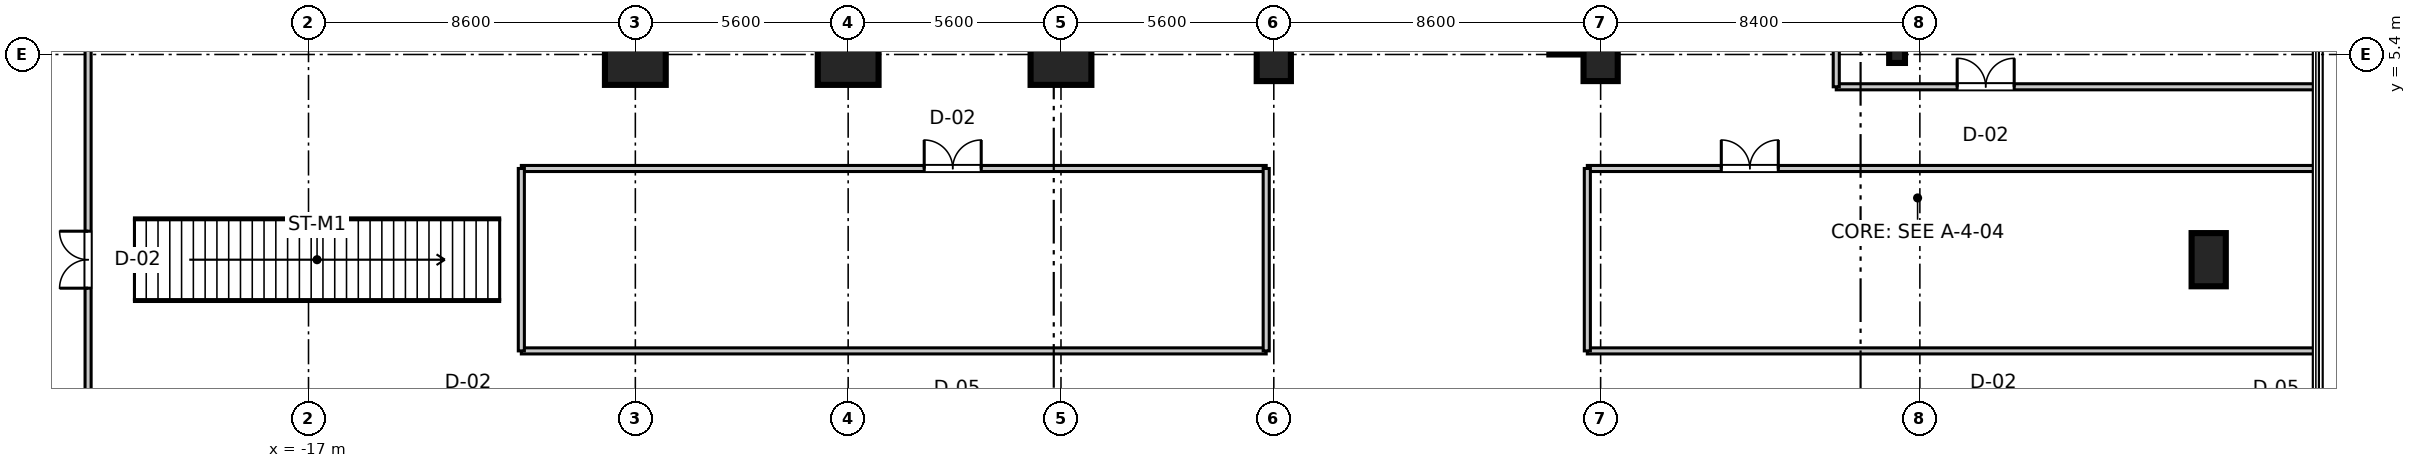
"""IFC4 building model, lengths in metres.
Left out: names, types, materials, properties, quantities, classifications, styles, units other than length and angle.
Written with IfcOpenShell. Run it as: python <this file> out.ifc"""

import sys

from ifc_helpers import new_model, si_unit, direction, frame, frame_2d, origin, origin_2d, place, context, subcontext, project, spatial, rectangle, i_section, extrude, source, transform, mapped, element, fill, save


model = new_model("IFC4")
c1 = context("Model", 3, precision=1e-05, world=origin(), true_north=direction((0.0, 1.0)))
c2 = subcontext(c1, "Body", "Model", "MODEL_VIEW")
j1 = project(units=[si_unit("LENGTHUNIT", "METRE"), si_unit("PLANEANGLEUNIT", "RADIAN")], contexts=[c1])
p1 = place(None, origin())
s1 = spatial("IfcSite", under=j1, at=p1, CompositionType="ELEMENT")
p2 = place(p1, origin())
s2 = spatial("IfcBuilding", under=s1, at=p2, CompositionType="ELEMENT")
p3 = place(p2, frame((0.0, 0.0, 16.2)))
s3 = spatial("IfcBuildingStorey", under=s2, at=p3, CompositionType="ELEMENT", Elevation=16.2)
m1 = source(origin(), c2, "Body", "SweptSolid", [
    extrude(rectangle(XDim=1.6, YDim=1.6, at=origin_2d()), origin(), (0.0, 0.0, 1.0), 5.355),
])
for number, where, z_axis, x_axis in (
    (1, (-8.4, 5.4, 0.0), (0.0, 0.0, 1.0), (1.0, 0.0, 0.0)),
    (2, (-2.8, 5.4, 0.0), (0.0, 0.0, 1.0), (1.0, 0.0, 0.0)),
    (3, (2.8, 5.4, 0.0), (0.0, 0.0, 1.0), (1.0, 0.0, 0.0)),
):
    element("IfcColumn", number, at=place(p3, frame(where, z_axis=z_axis, x_axis=x_axis)), inside=s3, PredefinedType="COLUMN", context=c2, shape_type="MappedRepresentation", body=[
        mapped(m1, transform((0.0, 0.0, 0.0), scale=1.0)),
    ])
m2 = source(origin(), c2, "Body", "SweptSolid", [
    extrude(rectangle(XDim=0.9, YDim=1.4, at=origin_2d()), origin(), (0.0, 0.0, 1.0), 5.355),
])
for number, where, z_axis, x_axis in (
    (4, (8.4, 5.4, 0.0), (0.0, 0.0, 1.0), (1.0, 0.0, 0.0)),
    (5, (17.0, 5.4, 0.0), (0.0, 0.0, 1.0), (1.0, 0.0, 0.0)),
    (6, (33.0, 0.0, 0.0), (0.0, 0.0, 1.0), (1.0, 0.0, 0.0)),
):
    element("IfcColumn", number, at=place(p3, frame(where, z_axis=z_axis, x_axis=x_axis)), inside=s3, PredefinedType="PILASTER", context=c2, shape_type="MappedRepresentation", body=[
        mapped(m2, transform((0.0, 0.0, 0.0), scale=1.0)),
    ])
m3 = source(origin(), c2, "Body", "SweptSolid", [
    extrude(i_section(OverallWidth=0.416, OverallDepth=0.446, WebThickness=0.025, FlangeThickness=0.04, at=origin_2d()), origin(), (0.0, 0.0, 1.0), 5.355),
])
p4 = place(p3, frame((24.8, 5.4, 0.0), z_axis=(0.0, 0.0, 1.0), x_axis=(1.0, 0.0, 0.0)))
e7 = element("IfcColumn", 7, at=p4, inside=s3, PredefinedType="COLUMN", context=c2, shape_type="MappedRepresentation", body=[
    mapped(m3, transform((0.0, 0.0, 0.0), scale=1.0)),
])
m4 = source(origin(), c2, "Body", "SweptSolid", [
    extrude(rectangle(XDim=11.6, YDim=0.8, at=frame_2d((5.8, 0.0))), origin(), (0.0, 0.0, 1.0), 5.08),
])
p5 = place(p3, frame((16.05, 5.4, 0.0), z_axis=(0.0, 0.0, 1.0), x_axis=(0.0, 1.0, 0.0)))
e8 = element("IfcWall", 8, at=p5, inside=s3, PredefinedType="SHEAR", context=c2, shape_type="MappedRepresentation", body=[
    mapped(m4, transform((0.0, 0.0, 0.0), scale=1.0)),
])
m5 = source(origin(), c2, "Body", "SweptSolid", [
    extrude(rectangle(XDim=33.6, YDim=0.16, at=frame_2d((16.8, 0.0))), origin(), (0.0, 0.0, 1.0), 3.4),
])
p6 = place(p3, frame((-22.8, -16.8, 0.0), z_axis=(0.0, 0.0, 1.0), x_axis=(0.0, 1.0, 0.0)))
e9 = element("IfcWall", 9, at=p6, inside=s3, PredefinedType="PARTITIONING", context=c2, shape_type="MappedRepresentation", body=[
    mapped(m5, transform((0.0, 0.0, 0.0), scale=1.0)),
])
p7 = place(p6, frame((16.05, 0.0, 0.0)))
e10 = element("IfcOpeningElement", 10, at=p7, cuts=e9, PredefinedType="OPENING", context=c2, shape_type="SweptSolid", body=[
    extrude(rectangle(XDim=1.5, YDim=2.15, at=frame_2d((0.75, 1.075))), frame((0.0, 0.09, 0.0), z_axis=(0.0, -1.0, 0.0), x_axis=(1.0, 0.0, 0.0)), (0.0, 0.0, 1.0), 0.18),
])
m6 = source(origin(), c2, "Body", "SweptSolid", [
    extrude(rectangle(XDim=19.6, YDim=0.16, at=frame_2d((9.8, 0.0))), origin(), (0.0, 0.0, 1.0), 3.4),
])
p8 = place(p3, frame((-11.4, -2.4, 0.0), z_axis=(0.0, 0.0, 1.0), x_axis=(1.0, 0.0, 0.0)))
e11 = element("IfcWall", 11, at=p8, inside=s3, PredefinedType="PARTITIONING", context=c2, shape_type="MappedRepresentation", body=[
    mapped(m6, transform((0.0, 0.0, 0.0), scale=1.0)),
])
p9 = place(p3, frame((-11.4, 2.4, 0.0), z_axis=(0.0, 0.0, 1.0), x_axis=(1.0, 0.0, 0.0)))
e12 = element("IfcWall", 12, at=p9, inside=s3, PredefinedType="PARTITIONING", context=c2, shape_type="MappedRepresentation", body=[
    mapped(m6, transform((0.0, 0.0, 0.0), scale=1.0)),
])
p10 = place(p9, frame((10.601, 0.0, 0.0)))
e13 = element("IfcOpeningElement", 13, at=p10, cuts=e12, PredefinedType="OPENING", context=c2, shape_type="SweptSolid", body=[
    extrude(rectangle(XDim=1.5, YDim=2.15, at=frame_2d((0.75, 1.075))), frame((0.0, 0.09, 0.0), z_axis=(0.0, -1.0, 0.0), x_axis=(1.0, 0.0, 0.0)), (0.0, 0.0, 1.0), 0.18),
])
m7 = source(origin(), c2, "Body", "SweptSolid", [
    extrude(rectangle(XDim=4.8, YDim=0.16, at=frame_2d((2.4, 0.0))), origin(), (0.0, 0.0, 1.0), 3.4),
])
for number, where, z_axis, x_axis in (
    (14, (-11.4, -2.4, 0.0), (0.0, 0.0, 1.0), (0.0, 1.0, 0.0)),
    (15, (8.2, -2.4, 0.0), (0.0, 0.0, 1.0), (0.0, 1.0, 0.0)),
):
    element("IfcWall", number, at=place(p3, frame(where, z_axis=z_axis, x_axis=x_axis)), inside=s3, PredefinedType="PARTITIONING", context=c2, shape_type="MappedRepresentation", body=[
        mapped(m7, transform((0.0, 0.0, 0.0), scale=1.0)),
    ])
m8 = source(origin(), c2, "Body", "SweptSolid", [
    extrude(rectangle(XDim=19.11, YDim=0.16, at=frame_2d((9.555, 0.0))), origin(), (0.0, 0.0, 1.0), 3.4),
])
p11 = place(p3, frame((16.65, -2.4, 0.0), z_axis=(0.0, 0.0, 1.0), x_axis=(1.0, 0.0, 0.0)))
e16 = element("IfcWall", 16, at=p11, inside=s3, PredefinedType="PARTITIONING", context=c2, shape_type="MappedRepresentation", body=[
    mapped(m8, transform((0.0, 0.0, 0.0), scale=1.0)),
])
p12 = place(p3, frame((16.65, 2.4, 0.0), z_axis=(0.0, 0.0, 1.0), x_axis=(1.0, 0.0, 0.0)))
e17 = element("IfcWall", 17, at=p12, inside=s3, PredefinedType="PARTITIONING", context=c2, shape_type="MappedRepresentation", body=[
    mapped(m8, transform((0.0, 0.0, 0.0), scale=1.0)),
])
p13 = place(p12, frame((3.525, 0.0, 0.0)))
e18 = element("IfcOpeningElement", 18, at=p13, cuts=e17, PredefinedType="OPENING", context=c2, shape_type="SweptSolid", body=[
    extrude(rectangle(XDim=1.5, YDim=2.15, at=frame_2d((0.75, 1.075))), frame((0.0, 0.09, 0.0), z_axis=(0.0, -1.0, 0.0), x_axis=(1.0, 0.0, 0.0)), (0.0, 0.0, 1.0), 0.18),
])
p14 = place(p3, frame((16.65, -2.4, 0.0), z_axis=(0.0, 0.0, 1.0), x_axis=(0.0, 1.0, 0.0)))
e19 = element("IfcWall", 19, at=p14, inside=s3, PredefinedType="PARTITIONING", context=c2, shape_type="MappedRepresentation", body=[
    mapped(m7, transform((0.0, 0.0, 0.0), scale=1.0)),
])
m9 = source(origin(), c2, "Body", "SweptSolid", [
    extrude(rectangle(XDim=12.56, YDim=0.16, at=frame_2d((6.28, 0.0))), origin(), (0.0, 0.0, 1.0), 3.4),
])
p15 = place(p3, frame((23.2, 4.55, 0.0), z_axis=(0.0, 0.0, 1.0), x_axis=(1.0, 0.0, 0.0)))
e20 = element("IfcWall", 20, at=p15, inside=s3, PredefinedType="PARTITIONING", context=c2, shape_type="MappedRepresentation", body=[
    mapped(m9, transform((0.0, 0.0, 0.0), scale=1.0)),
])
p16 = place(p15, frame((3.182, 0.0, 0.0)))
e21 = element("IfcOpeningElement", 21, at=p16, cuts=e20, PredefinedType="OPENING", context=c2, shape_type="SweptSolid", body=[
    extrude(rectangle(XDim=1.5, YDim=2.15, at=frame_2d((0.75, 1.075))), frame((0.0, 0.09, 0.0), z_axis=(0.0, -1.0, 0.0), x_axis=(1.0, 0.0, 0.0)), (0.0, 0.0, 1.0), 0.18),
])
m10 = source(origin(), c2, "Body", "SweptSolid", [
    extrude(rectangle(XDim=19.21, YDim=0.16, at=frame_2d((9.605, 0.0))), origin(), (0.0, 0.0, 1.0), 3.4),
])
p17 = place(p3, frame((23.2, 4.55, 0.0), z_axis=(0.0, 0.0, 1.0), x_axis=(0.0, 1.0, 0.0)))
e22 = element("IfcWall", 22, at=p17, inside=s3, PredefinedType="PARTITIONING", context=c2, shape_type="MappedRepresentation", body=[
    mapped(m10, transform((0.0, 0.0, 0.0), scale=1.0)),
])
m11 = source(origin(), c2, "Body", "SweptSolid", [
    extrude(rectangle(XDim=1.5, YDim=2.15, at=frame_2d((0.75, 1.075))), frame((0.0, 0.025, 0.0), z_axis=(0.0, -1.0, 0.0), x_axis=(1.0, 0.0, 0.0)), (0.0, 0.0, 1.0), 0.05),
])
p18 = place(p7, origin())
e23 = element("IfcDoor", 23, at=p18, inside=s3, OperationType="DOUBLE_DOOR_SINGLE_SWING", PredefinedType="DOOR", context=c2, shape_type="MappedRepresentation", body=[
    mapped(m11, transform((0.0, 0.0, 0.0), scale=1.0)),
])
fill(e10, e23)
p19 = place(p10, frame((1.5, 0.0, 0.0), z_axis=(0.0, 0.0, 1.0), x_axis=(-1.0, 0.0, 0.0)))
e24 = element("IfcDoor", 24, at=p19, inside=s3, OperationType="DOUBLE_DOOR_SINGLE_SWING", PredefinedType="DOOR", context=c2, shape_type="MappedRepresentation", body=[
    mapped(m11, transform((0.0, 0.0, 0.0), scale=1.0)),
])
fill(e13, e24)
p20 = place(p13, frame((1.5, 0.0, 0.0), z_axis=(0.0, 0.0, 1.0), x_axis=(-1.0, 0.0, 0.0)))
e25 = element("IfcDoor", 25, at=p20, inside=s3, OperationType="DOUBLE_DOOR_SINGLE_SWING", PredefinedType="DOOR", context=c2, shape_type="MappedRepresentation", body=[
    mapped(m11, transform((0.0, 0.0, 0.0), scale=1.0)),
])
fill(e18, e25)
p21 = place(p16, origin())
e26 = element("IfcDoor", 26, at=p21, inside=s3, OperationType="DOUBLE_DOOR_SINGLE_SWING", PredefinedType="DOOR", context=c2, shape_type="MappedRepresentation", body=[
    mapped(m11, transform((0.0, 0.0, 0.0), scale=1.0)),
])
fill(e21, e26)
save(model, sys.argv[1])
